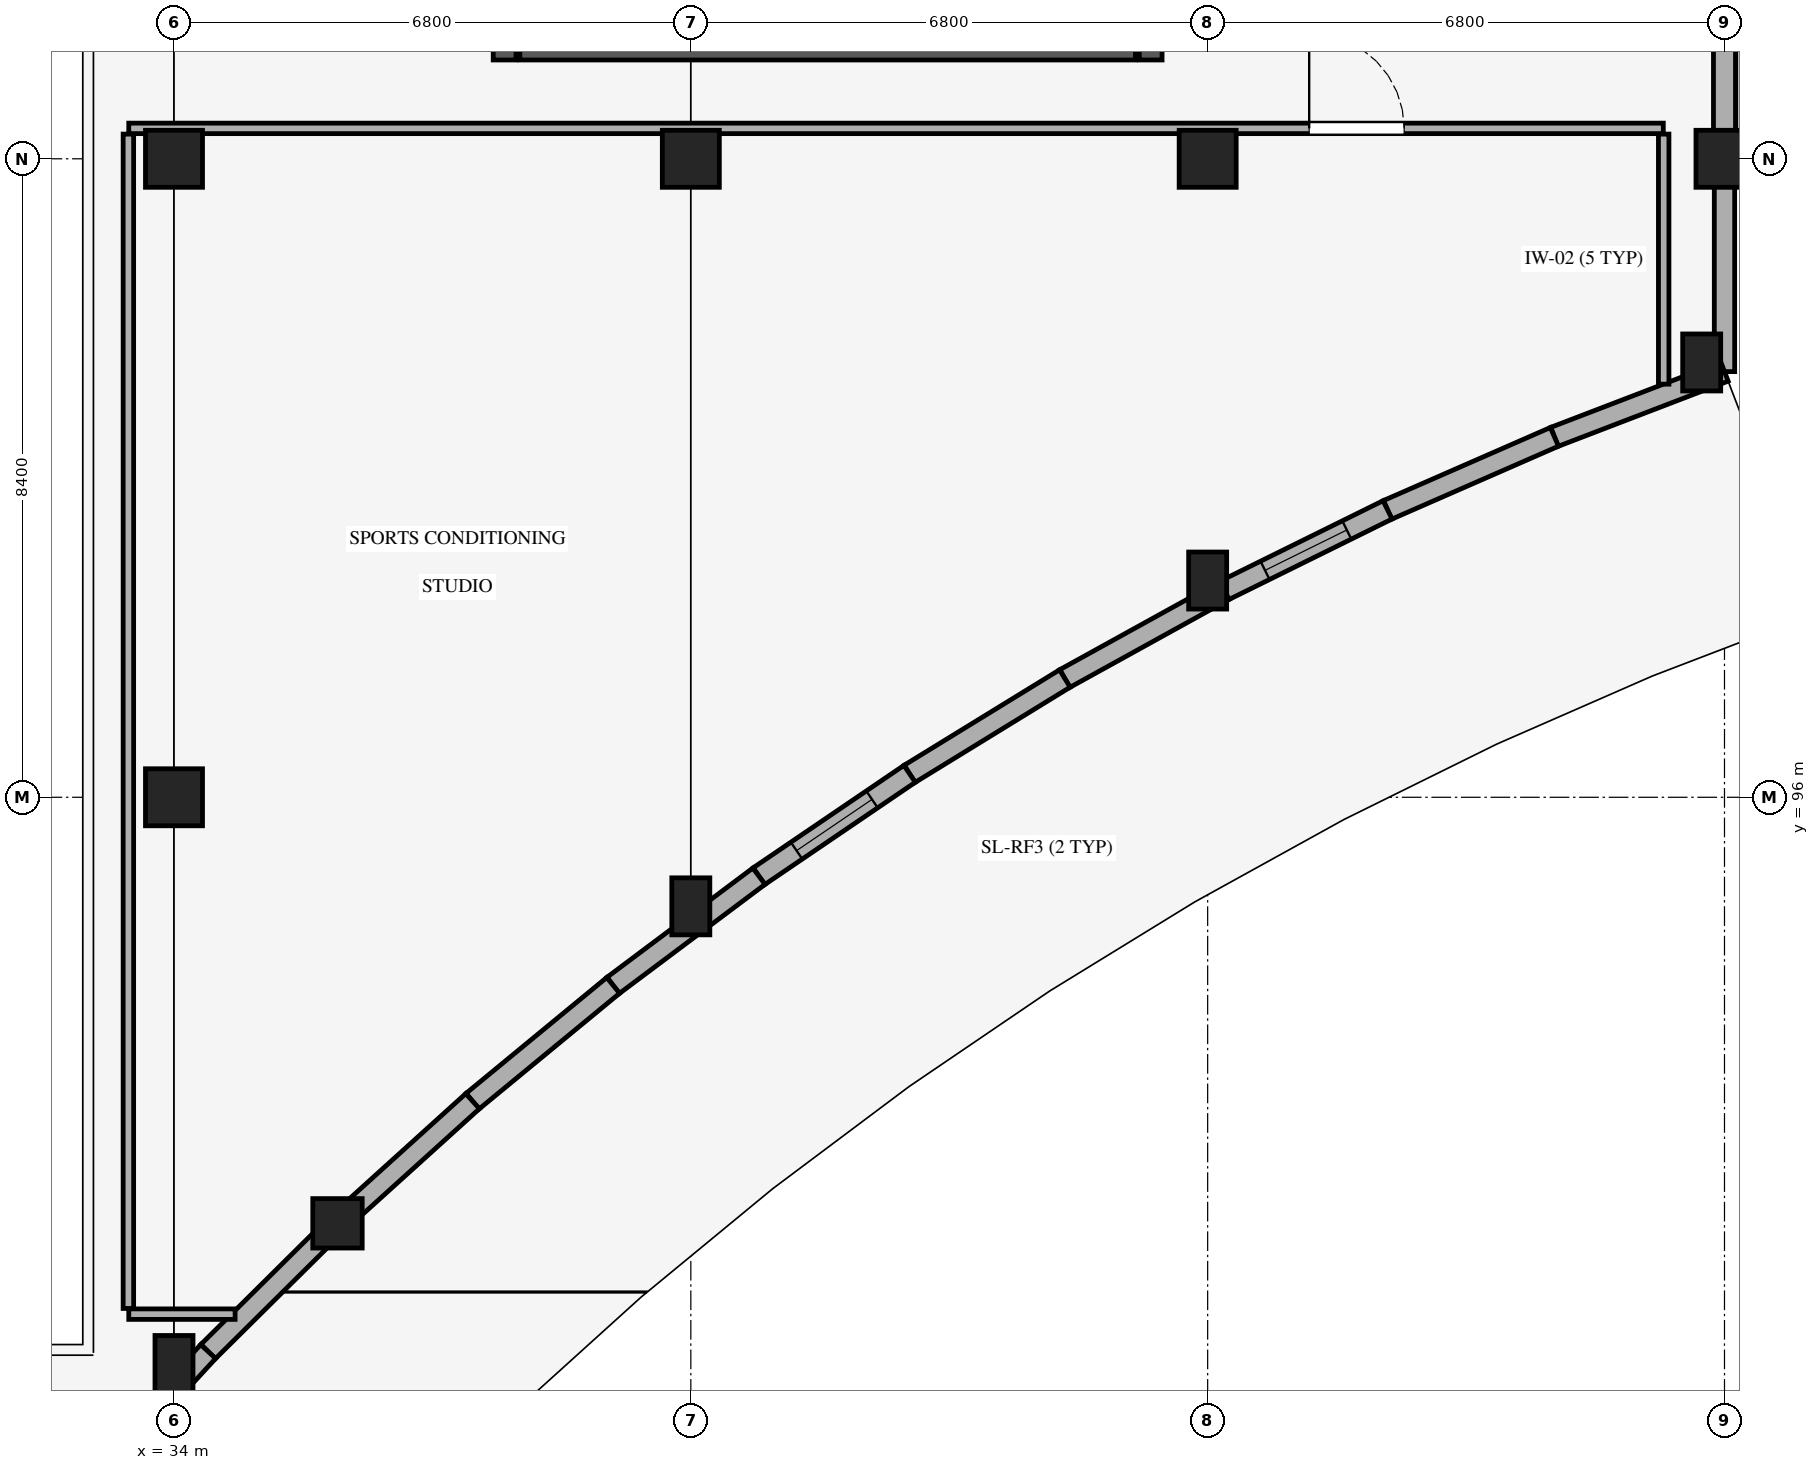
"""IFC4 building model, lengths in metres.
Left out: names, types, materials, properties, quantities, classifications, styles, units other than length and angle.
Written with IfcOpenShell. Run it as: python <this file> out.ifc"""

import sys

from ifc_helpers import new_model, si_unit, direction, frame, frame_2d, origin, origin_2d, place, context, subcontext, project, spatial, rectangle, circle, extrude, element, fill, save


model = new_model("IFC4")
c1 = context("Model", 3, precision=1e-05, world=origin(), true_north=direction((0.0, 1.0)))
c2 = subcontext(c1, "Body", "Model", "MODEL_VIEW")
j1 = project(units=[si_unit("LENGTHUNIT", "METRE"), si_unit("PLANEANGLEUNIT", "RADIAN")], contexts=[c1])
p1 = place(None, origin())
s1 = spatial("IfcSite", under=j1, at=p1, CompositionType="ELEMENT")
p2 = place(p1, origin())
s2 = spatial("IfcBuilding", under=s1, at=p2, CompositionType="ELEMENT")
p3 = place(p2, frame((0.0, 0.0, 4.8)))
s3 = spatial("IfcBuildingStorey", under=s2, at=p3, CompositionType="ELEMENT", Elevation=4.8)
p4 = place(p3, frame((34.0, 88.544, 0.0), z_axis=(0.0, 0.0, 1.0), x_axis=(1.0, 0.0, 0.0)))
e1 = element("IfcColumn", 1, at=p4, inside=s3, PredefinedType="COLUMN", context=c2, shape_type="SweptSolid", body=[
    extrude(rectangle(XDim=0.5, YDim=0.75, at=origin_2d()), origin(), (0.0, 0.0, 1.0), 4.8),
])
for number, where, z_axis, x_axis in (
    (2, (34.0, 96.0, 0.0), (0.0, 0.0, 1.0), (1.0, 0.0, 0.0)),
    (3, (34.0, 104.4, 0.0), (0.0, 0.0, 1.0), (1.0, 0.0, 0.0)),
):
    element("IfcColumn", number, at=place(p3, frame(where, z_axis=z_axis, x_axis=x_axis)), inside=s3, PredefinedType="COLUMN", context=c2, shape_type="SweptSolid", body=[
        extrude(rectangle(XDim=0.75, YDim=0.75, at=origin_2d()), origin(), (0.0, 0.0, 1.0), 4.8),
    ])
p5 = place(p3, frame((36.151, 90.395, 0.0), z_axis=(0.0, 0.0, 1.0), x_axis=(1.0, 0.0, 0.0)))
e4 = element("IfcColumn", 4, at=p5, inside=s3, PredefinedType="COLUMN", context=c2, shape_type="SweptSolid", body=[
    extrude(circle(Radius=0.325, at=origin_2d()), origin(), (0.0, 0.0, 1.0), 4.8),
])
p6 = place(p3, frame((40.8, 94.565, 0.0), z_axis=(0.0, 0.0, 1.0), x_axis=(1.0, 0.0, 0.0)))
e5 = element("IfcColumn", 5, at=p6, inside=s3, PredefinedType="COLUMN", context=c2, shape_type="SweptSolid", body=[
    extrude(rectangle(XDim=0.5, YDim=0.75, at=origin_2d()), origin(), (0.0, 0.0, 1.0), 4.8),
])
p7 = place(p3, frame((40.8, 104.4, 0.0), z_axis=(0.0, 0.0, 1.0), x_axis=(1.0, 0.0, 0.0)))
e6 = element("IfcColumn", 6, at=p7, inside=s3, PredefinedType="COLUMN", context=c2, shape_type="SweptSolid", body=[
    extrude(rectangle(XDim=0.75, YDim=0.75, at=origin_2d()), origin(), (0.0, 0.0, 1.0), 4.8),
])
p8 = place(p3, frame((47.6, 98.851, 0.0), z_axis=(0.0, 0.0, 1.0), x_axis=(1.0, 0.0, 0.0)))
e7 = element("IfcColumn", 7, at=p8, inside=s3, PredefinedType="COLUMN", context=c2, shape_type="SweptSolid", body=[
    extrude(rectangle(XDim=0.5, YDim=0.75, at=origin_2d()), origin(), (0.0, 0.0, 1.0), 4.8),
])
p9 = place(p3, frame((47.6, 104.4, 0.0), z_axis=(0.0, 0.0, 1.0), x_axis=(1.0, 0.0, 0.0)))
e8 = element("IfcColumn", 8, at=p9, inside=s3, PredefinedType="COLUMN", context=c2, shape_type="SweptSolid", body=[
    extrude(rectangle(XDim=0.75, YDim=0.75, at=origin_2d()), origin(), (0.0, 0.0, 1.0), 4.8),
])
p10 = place(p3, frame((54.1, 101.72, 0.0), z_axis=(0.0, 0.0, 1.0), x_axis=(1.0, 0.0, 0.0)))
e9 = element("IfcColumn", 9, at=p10, inside=s3, PredefinedType="COLUMN", context=c2, shape_type="SweptSolid", body=[
    extrude(rectangle(XDim=0.5, YDim=0.75, at=origin_2d()), origin(), (0.0, 0.0, 1.0), 4.8),
])
p11 = place(p3, frame((54.4, 104.4, 0.0), z_axis=(0.0, 0.0, 1.0), x_axis=(1.0, 0.0, 0.0)))
e10 = element("IfcColumn", 10, at=p11, inside=s3, PredefinedType="COLUMN", context=c2, shape_type="SweptSolid", body=[
    extrude(rectangle(XDim=0.75, YDim=0.75, at=origin_2d()), origin(), (0.0, 0.0, 1.0), 4.8),
])
p12 = place(p3, frame((54.4, 111.6, 0.0), z_axis=(0.0, 0.0, 1.0), x_axis=(0.0, -1.0, 0.0)))
e11 = element("IfcWall", 11, at=p12, inside=s3, PredefinedType="STANDARD", context=c2, shape_type="SweptSolid", body=[
    extrude(rectangle(XDim=7.2, YDim=0.29, at=frame_2d((3.6, 0.0))), origin(), (0.0, 0.0, 1.0), 2.37),
])
p13 = place(p12, frame((2.925, 0.0, 0.0)))
e12 = element("IfcOpeningElement", 12, at=p13, cuts=e11, PredefinedType="OPENING", context=c2, shape_type="SweptSolid", body=[
    extrude(rectangle(XDim=1.35, YDim=2.15, at=frame_2d((0.675, 1.075))), frame((0.0, 0.155, 0.0), z_axis=(0.0, -1.0, 0.0), x_axis=(1.0, 0.0, 0.0)), (0.0, 0.0, 1.0), 0.31),
])
p14 = place(p3, frame((54.4, 104.4, 0.0), z_axis=(0.0, 0.0, 1.0), x_axis=(0.0, -1.0, 0.0)))
e13 = element("IfcWall", 13, at=p14, inside=s3, PredefinedType="STANDARD", context=c2, shape_type="SweptSolid", body=[
    extrude(rectangle(XDim=2.8, YDim=0.268, at=frame_2d((1.4, 0.0))), origin(), (0.0, 0.0, 1.0), 2.37),
])
for number, where, z_axis, x_axis in (
    (14, (54.4, 101.6, 0.0), (0.0, 0.0, 1.0), (-0.934, -0.358, 0.0)),
    (15, (52.163, 100.742, 0.0), (0.0, 0.0, 1.0), (-0.916, -0.401, 0.0)),
):
    element("IfcWall", number, at=place(p3, frame(where, z_axis=z_axis, x_axis=x_axis)), inside=s3, PredefinedType="STANDARD", context=c2, shape_type="SweptSolid", body=[
        extrude(rectangle(XDim=2.396, YDim=0.268, at=frame_2d((1.198, 0.0))), origin(), (0.0, 0.0, 1.0), 3.405),
    ])
p15 = place(p3, frame((49.967, 99.781, 0.0), z_axis=(0.0, 0.0, 1.0), x_axis=(-0.896737964663, -0.442561885764, 0.0)))
e16 = element("IfcWall", 16, at=p15, inside=s3, PredefinedType="STANDARD", context=c2, shape_type="SweptSolid", body=[
    extrude(rectangle(XDim=2.396, YDim=0.268, at=frame_2d((1.198, 0.0))), origin(), (0.0, 0.0, 1.0), 3.405),
])
p16 = place(p15, frame((0.598, 0.0, 0.9)))
e17 = element("IfcOpeningElement", 17, at=p16, cuts=e16, PredefinedType="OPENING", context=c2, shape_type="SweptSolid", body=[
    extrude(rectangle(XDim=1.2, YDim=1.8, at=frame_2d((0.6, 0.9))), frame((0.0, 0.144, 0.0), z_axis=(0.0, -1.0, 0.0), x_axis=(1.0, 0.0, 0.0)), (0.0, 0.0, 1.0), 0.288),
])
for number, where, z_axis, x_axis in (
    (18, (47.818, 98.721, 0.0), (0.0, 0.0, 1.0), (-0.875, -0.483, 0.0)),
    (19, (45.721, 97.562, 0.0), (0.0, 0.0, 1.0), (-0.852, -0.523, 0.0)),
):
    element("IfcWall", number, at=place(p3, frame(where, z_axis=z_axis, x_axis=x_axis)), inside=s3, PredefinedType="STANDARD", context=c2, shape_type="SweptSolid", body=[
        extrude(rectangle(XDim=2.396, YDim=0.268, at=frame_2d((1.198, 0.0))), origin(), (0.0, 0.0, 1.0), 3.405),
    ])
p17 = place(p3, frame((43.679, 96.308, 0.0), z_axis=(0.0, 0.0, 1.0), x_axis=(-0.827159505426, -0.561967216644, 0.0)))
e20 = element("IfcWall", 20, at=p17, inside=s3, PredefinedType="STANDARD", context=c2, shape_type="SweptSolid", body=[
    extrude(rectangle(XDim=2.396, YDim=0.268, at=frame_2d((1.198, 0.0))), origin(), (0.0, 0.0, 1.0), 3.405),
])
p18 = place(p17, frame((0.598, 0.0, 0.9)))
e21 = element("IfcOpeningElement", 21, at=p18, cuts=e20, PredefinedType="OPENING", context=c2, shape_type="SweptSolid", body=[
    extrude(rectangle(XDim=1.2, YDim=1.8, at=frame_2d((0.6, 0.9))), frame((0.0, 0.144, 0.0), z_axis=(0.0, -1.0, 0.0), x_axis=(1.0, 0.0, 0.0)), (0.0, 0.0, 1.0), 0.288),
])
p19 = place(p3, frame((41.697, 94.962, 0.0), z_axis=(0.0, 0.0, 1.0), x_axis=(-0.800391059778, -0.599478232655, 0.0)))
e22 = element("IfcWall", 22, at=p19, inside=s3, PredefinedType="STANDARD", context=c2, shape_type="SweptSolid", body=[
    extrude(rectangle(XDim=2.396, YDim=0.268, at=frame_2d((1.198, 0.0))), origin(), (0.0, 0.0, 1.0), 3.405),
])
p20 = place(p3, frame((39.779, 93.525, 0.0), z_axis=(0.0, 0.0, 1.0), x_axis=(-0.771924354008, -0.635714394748, 0.0)))
e23 = element("IfcWall", 23, at=p20, inside=s3, PredefinedType="STANDARD", context=c2, shape_type="SweptSolid", body=[
    extrude(rectangle(XDim=2.396, YDim=0.268, at=frame_2d((1.198, 0.0))), origin(), (0.0, 0.0, 1.0), 3.405),
])
for number, where, z_axis, x_axis in (
    (24, (37.929, 92.002, 0.0), (0.0, 0.0, 1.0), (-0.742, -0.671, 0.0)),
    (25, (36.151, 90.395, 0.0), (0.0, 0.0, 1.0), (-0.71, -0.704, 0.0)),
):
    element("IfcWall", number, at=place(p3, frame(where, z_axis=z_axis, x_axis=x_axis)), inside=s3, PredefinedType="STANDARD", context=c2, shape_type="SweptSolid", body=[
        extrude(rectangle(XDim=2.396, YDim=0.268, at=frame_2d((1.198, 0.0))), origin(), (0.0, 0.0, 1.0), 3.405),
    ])
p21 = place(p3, frame((34.449, 88.708, 0.0), z_axis=(0.0, 0.0, 1.0), x_axis=(-0.676946175491, -0.73603252339, 0.0)))
e26 = element("IfcWall", 26, at=p21, inside=s3, PredefinedType="STANDARD", context=c2, shape_type="SweptSolid", body=[
    extrude(rectangle(XDim=2.396, YDim=0.268, at=frame_2d((1.198, 0.0))), origin(), (0.0, 0.0, 1.0), 3.405),
])
p22 = place(p3, frame((38.35, 109.6, 0.0), z_axis=(0.0, 0.0, 1.0), x_axis=(0.0, -1.0, 0.0)))
e27 = element("IfcWall", 27, at=p22, inside=s3, PredefinedType="SHEAR", context=c2, shape_type="SweptSolid", body=[
    extrude(rectangle(XDim=3.9, YDim=0.3, at=frame_2d((1.95, 0.0))), origin(), (0.0, 0.0, 1.0), 4.54),
])
p23 = place(p22, frame((1.325, 0.0, 0.0)))
e28 = element("IfcOpeningElement", 28, at=p23, cuts=e27, PredefinedType="OPENING", context=c2, shape_type="SweptSolid", body=[
    extrude(rectangle(XDim=1.25, YDim=2.2, at=frame_2d((0.625, 1.1))), frame((0.0, 0.16, 0.0), z_axis=(0.0, -1.0, 0.0), x_axis=(1.0, 0.0, 0.0)), (0.0, 0.0, 1.0), 0.32),
])
p24 = place(p3, frame((38.55, 105.85, 0.0), z_axis=(0.0, 0.0, 1.0), x_axis=(1.0, 0.0, 0.0)))
e29 = element("IfcWall", 29, at=p24, inside=s3, PredefinedType="SHEAR", context=c2, shape_type="SweptSolid", body=[
    extrude(rectangle(XDim=8.1, YDim=0.3, at=frame_2d((4.05, 0.0))), origin(), (0.0, 0.0, 1.0), 4.54),
])
p25 = place(p3, frame((46.85, 105.7, 0.0), z_axis=(0.0, 0.0, 1.0), x_axis=(0.0, 1.0, 0.0)))
e30 = element("IfcWall", 30, at=p25, inside=s3, PredefinedType="SHEAR", context=c2, shape_type="SweptSolid", body=[
    extrude(rectangle(XDim=3.9, YDim=0.3, at=frame_2d((1.95, 0.0))), origin(), (0.0, 0.0, 1.0), 4.54),
])
p26 = place(p3, frame((53.6, 104.725, 0.0), z_axis=(0.0, 0.0, 1.0), x_axis=(0.0, -1.0, 0.0)))
e31 = element("IfcWall", 31, at=p26, inside=s3, PredefinedType="STANDARD", context=c2, shape_type="SweptSolid", body=[
    extrude(rectangle(XDim=3.29, YDim=0.138, at=frame_2d((1.645, 0.0))), origin(), (0.0, 0.0, 1.0), 3.405),
])
p27 = place(p3, frame((34.804, 89.2, 0.0), z_axis=(0.0, 0.0, 1.0), x_axis=(-1.0, 0.0, 0.0)))
e32 = element("IfcWall", 32, at=p27, inside=s3, PredefinedType="STANDARD", context=c2, shape_type="SweptSolid", body=[
    extrude(rectangle(XDim=1.399, YDim=0.138, at=frame_2d((0.699, 0.0))), origin(), (0.0, 0.0, 1.0), 3.405),
])
p28 = place(p3, frame((33.4, 89.275, 0.0), z_axis=(0.0, 0.0, 1.0), x_axis=(0.0, 1.0, 0.0)))
e33 = element("IfcWall", 33, at=p28, inside=s3, PredefinedType="STANDARD", context=c2, shape_type="SweptSolid", body=[
    extrude(rectangle(XDim=15.45, YDim=0.138, at=frame_2d((7.725, 0.0))), origin(), (0.0, 0.0, 1.0), 4.54),
])
p29 = place(p3, frame((33.405, 104.8, 0.0), z_axis=(0.0, 0.0, 1.0), x_axis=(1.0, 0.0, 0.0)))
e34 = element("IfcWall", 34, at=p29, inside=s3, PredefinedType="STANDARD", context=c2, shape_type="SweptSolid", body=[
    extrude(rectangle(XDim=20.19, YDim=0.138, at=frame_2d((10.095, 0.0))), origin(), (0.0, 0.0, 1.0), 3.525),
])
p30 = place(p29, frame((15.531, 0.0, 0.0)))
e35 = element("IfcOpeningElement", 35, at=p30, cuts=e34, PredefinedType="OPENING", context=c2, shape_type="SweptSolid", body=[
    extrude(rectangle(XDim=1.25, YDim=2.16, at=frame_2d((0.625, 1.08))), frame((0.0, 0.079, 0.0), z_axis=(0.0, -1.0, 0.0), x_axis=(1.0, 0.0, 0.0)), (0.0, 0.0, 1.0), 0.158),
])
p31 = place(p16, origin())
e36 = element("IfcWindow", 36, at=p31, inside=s3, PartitioningType="SINGLE_PANEL", PredefinedType="WINDOW", context=c2, shape_type="SweptSolid", body=[
    extrude(rectangle(XDim=1.2, YDim=1.8, at=frame_2d((0.6, 0.9))), frame((0.0, 0.03, 0.0), z_axis=(0.0, -1.0, 0.0), x_axis=(1.0, 0.0, 0.0)), (0.0, 0.0, 1.0), 0.06),
])
fill(e17, e36)
p32 = place(p18, origin())
e37 = element("IfcWindow", 37, at=p32, inside=s3, PartitioningType="SINGLE_PANEL", PredefinedType="WINDOW", context=c2, shape_type="SweptSolid", body=[
    extrude(rectangle(XDim=1.2, YDim=1.8, at=frame_2d((0.6, 0.9))), frame((0.0, 0.03, 0.0), z_axis=(0.0, -1.0, 0.0), x_axis=(1.0, 0.0, 0.0)), (0.0, 0.0, 1.0), 0.06),
])
fill(e21, e37)
p33 = place(p30, origin())
e38 = element("IfcDoor", 38, at=p33, inside=s3, OperationType="SINGLE_SWING_LEFT", PredefinedType="DOOR", context=c2, shape_type="SweptSolid", body=[
    extrude(rectangle(XDim=1.25, YDim=2.16, at=frame_2d((0.625, 1.08))), frame((0.0, 0.025, 0.0), z_axis=(0.0, -1.0, 0.0), x_axis=(1.0, 0.0, 0.0)), (0.0, 0.0, 1.0), 0.05),
])
fill(e35, e38)
save(model, sys.argv[1])
